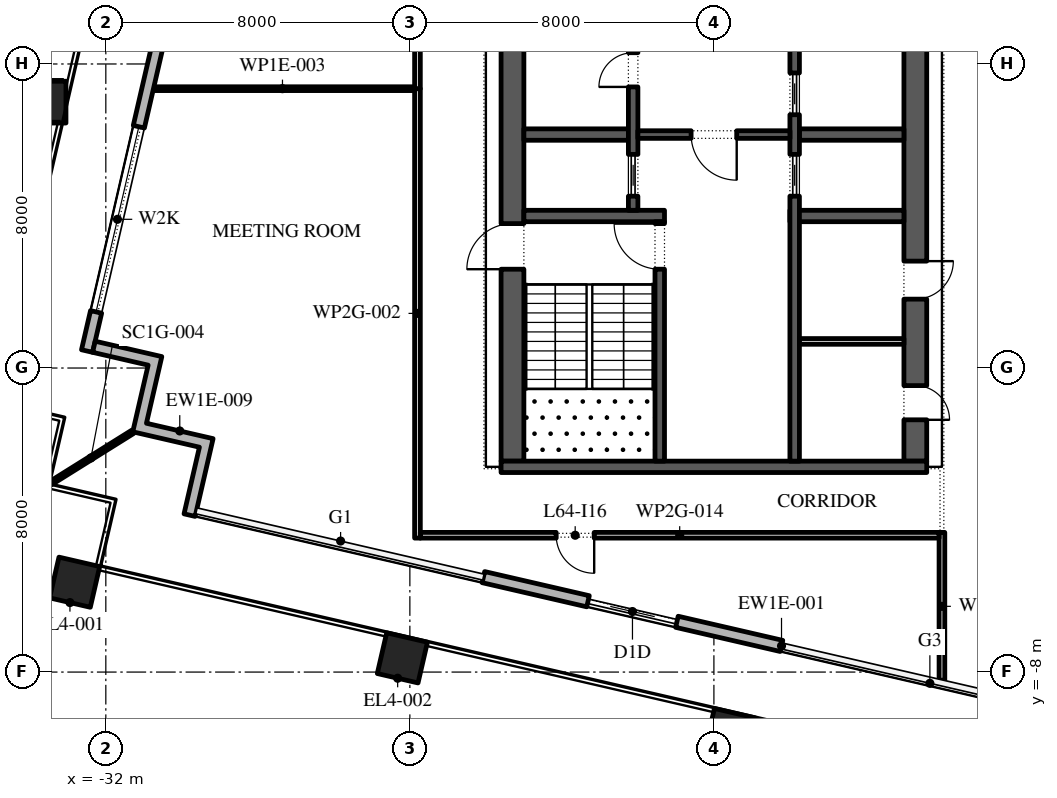
"""IFC4 building model, lengths in metres.
Left out: names, types, materials, properties, quantities, classifications, styles, units other than length and angle.
Written with IfcOpenShell. Run it as: python <this file> out.ifc"""

import sys

from ifc_helpers import new_model, si_unit, direction, frame, frame_2d, origin, origin_2d, place, context, subcontext, project, spatial, polyline, rectangle, outline, extrude, element, fill, save


model = new_model("IFC4")
c1 = context("Model", 3, precision=1e-05, world=origin(), true_north=direction((0.0, 1.0)))
c2 = subcontext(c1, "Body", "Model", "MODEL_VIEW")
j1 = project(units=[si_unit("LENGTHUNIT", "METRE"), si_unit("PLANEANGLEUNIT", "RADIAN")], contexts=[c1])
p1 = place(None, origin())
s1 = spatial("IfcSite", under=j1, at=p1, CompositionType="ELEMENT")
p2 = place(p1, origin())
s2 = spatial("IfcBuilding", under=s1, at=p2, CompositionType="ELEMENT")
p3 = place(p2, frame((0.0, 0.0, 293.4)))
s3 = spatial("IfcBuildingStorey", under=s2, at=p3, CompositionType="ELEMENT", Elevation=293.4)
for number, where, z_axis, x_axis in (
    (1, (-32.821, -5.635, 0.0), (0.0, 0.0, 1.0), (0.974, -0.225, 0.0)),
    (2, (-24.197, -7.626, 0.0), (0.0, 0.0, 1.0), (0.974, -0.225, 0.0)),
    (3, (-15.574, -9.617, 0.0), (0.0, 0.0, 1.0), (0.974, -0.225, 0.0)),
):
    element("IfcColumn", number, at=place(p3, frame(where, z_axis=z_axis, x_axis=x_axis)), inside=s3, PredefinedType="COLUMN", context=c2, shape_type="SweptSolid", body=[
        extrude(rectangle(XDim=1.1, YDim=1.1, at=origin_2d()), origin(), (0.0, 0.0, 1.0), 4.2),
    ])
p4 = place(p3, frame((-33.599, 6.996, 0.0), z_axis=(0.002906057426, 0.012612289227, 0.999916238987), x_axis=(-0.974466825284, 0.224531526563, 0.0)))
e4 = element("IfcColumn", 4, at=p4, inside=s3, PredefinedType="COLUMN", context=c2, shape_type="SweptSolid", body=[
    extrude(rectangle(XDim=1.1, YDim=1.1, at=origin_2d()), origin(), (0.0, 0.0, 1.0), 4.2),
])
p5 = place(p3, frame((-22.065, -5.502, 0.0), z_axis=(0.0, 0.0, 1.0), x_axis=(0.974372279954, -0.224941459176, 0.0)))
e5 = element("IfcWall", 5, at=p5, inside=s3, PredefinedType="STANDARD", context=c2, shape_type="SweptSolid", body=[
    extrude(rectangle(XDim=8.05, YDim=0.3, at=frame_2d((4.025, 0.0))), origin(), (0.0, 0.0, 1.0), 3.75),
])
p6 = place(p5, frame((2.825, 0.0, 0.0)))
e6 = element("IfcOpeningElement", 6, at=p6, cuts=e5, PredefinedType="OPENING", context=c2, shape_type="SweptSolid", body=[
    extrude(rectangle(XDim=2.4, YDim=3.3, at=frame_2d((1.2, 1.65))), frame((0.0, 0.16, 0.0), z_axis=(0.0, -1.0, 0.0), x_axis=(1.0, 0.0, 0.0)), (0.0, 0.0, 1.0), 0.32),
])
p7 = place(p3, origin())
e7 = element("IfcWall", 7, at=p7, inside=s3, PredefinedType="STANDARD", context=c2, shape_type="SweptSolid", body=[
    extrude(outline(polyline([(-31.291, -1.678), (-30.886, 0.076), (-32.348, 0.413), (-32.28, 0.705), (-30.526, 0.301), (-30.931, -1.453), (-29.177, -1.858), (-29.65, -3.905), (-29.942, -3.837), (-29.537, -2.083), (-31.291, -1.678)])), origin(), (0.0, 0.0, 1.0), 3.75),
])
p8 = place(p3, frame((-31.291, -1.678, -0.05), z_axis=(0.0, 0.0, 1.0), x_axis=(-0.84807753525, -0.529872148923, 0.0)))
e8 = element("IfcWall", 8, at=p8, inside=s3, PredefinedType="STANDARD", context=c2, shape_type="SweptSolid", body=[
    extrude(rectangle(XDim=2.596, YDim=0.1, at=frame_2d((1.298, 0.0))), origin(), (0.0, 0.0, 1.0), 3.8),
])
p9 = place(p3, frame((-21.3, -2.45, 0.0), z_axis=(0.0, 0.0, 1.0), x_axis=(0.0, 1.0, 0.0)))
e9 = element("IfcWall", 9, at=p9, inside=s3, PredefinedType="SHEAR", context=c2, shape_type="SweptSolid", body=[
    extrude(rectangle(XDim=27.9, YDim=0.6, at=frame_2d((13.95, 0.0))), origin(), (0.0, 0.0, 1.0), 3.75),
])
p10 = place(p9, frame((5.05, 0.0, 0.0)))
e10 = element("IfcOpeningElement", 10, at=p10, cuts=e9, PredefinedType="OPENING", context=c2, shape_type="SweptSolid", body=[
    extrude(rectangle(XDim=1.2, YDim=2.1, at=frame_2d((0.6, 1.05))), frame((0.0, 0.31, 0.0), z_axis=(0.0, -1.0, 0.0), x_axis=(1.0, 0.0, 0.0)), (0.0, 0.0, 1.0), 0.62),
])
p11 = place(p9, frame((21.65, 0.0, 0.0)))
e11 = element("IfcOpeningElement", 11, at=p11, cuts=e9, PredefinedType="OPENING", context=c2, shape_type="SweptSolid", body=[
    extrude(rectangle(XDim=1.2, YDim=2.1, at=frame_2d((0.6, 1.05))), frame((0.0, 0.31, 0.0), z_axis=(0.0, -1.0, 0.0), x_axis=(1.0, 0.0, 0.0)), (0.0, 0.0, 1.0), 0.62),
])
p12 = place(p3, frame((-10.7, -2.45, 0.0), z_axis=(0.0, 0.0, 1.0), x_axis=(0.0, 1.0, 0.0)))
e12 = element("IfcWall", 12, at=p12, inside=s3, PredefinedType="SHEAR", context=c2, shape_type="SweptSolid", body=[
    extrude(rectangle(XDim=27.9, YDim=0.6, at=frame_2d((13.95, 0.0))), origin(), (0.0, 0.0, 1.0), 3.75),
])
p13 = place(p12, frame((23.65, 0.0, 0.0)))
e13 = element("IfcOpeningElement", 13, at=p13, cuts=e12, PredefinedType="OPENING", context=c2, shape_type="SweptSolid", body=[
    extrude(rectangle(XDim=2.4, YDim=2.1, at=frame_2d((1.2, 1.05))), frame((0.0, 0.31, 0.0), z_axis=(0.0, -1.0, 0.0), x_axis=(1.0, 0.0, 0.0)), (0.0, 0.0, 1.0), 0.62),
])
p14 = place(p12, frame((1.087, 0.0, 0.0)))
e14 = element("IfcOpeningElement", 14, at=p14, cuts=e12, PredefinedType="OPENING", context=c2, shape_type="SweptSolid", body=[
    extrude(rectangle(XDim=0.9, YDim=2.1, at=frame_2d((0.45, 1.05))), frame((0.0, 0.31, 0.0), z_axis=(0.0, -1.0, 0.0), x_axis=(1.0, 0.0, 0.0)), (0.0, 0.0, 1.0), 0.62),
])
p15 = place(p12, frame((4.262, 0.0, 0.0)))
e15 = element("IfcOpeningElement", 15, at=p15, cuts=e12, PredefinedType="OPENING", context=c2, shape_type="SweptSolid", body=[
    extrude(rectangle(XDim=1.0, YDim=2.1, at=frame_2d((0.5, 1.05))), frame((0.0, 0.31, 0.0), z_axis=(0.0, -1.0, 0.0), x_axis=(1.0, 0.0, 0.0)), (0.0, 0.0, 1.0), 0.62),
])
p16 = place(p3, frame((-21.6, -2.6, 0.0), z_axis=(0.0, 0.0, 1.0), x_axis=(1.0, 0.0, 0.0)))
e16 = element("IfcWall", 16, at=p16, inside=s3, PredefinedType="SHEAR", context=c2, shape_type="SweptSolid", body=[
    extrude(rectangle(XDim=11.2, YDim=0.3, at=frame_2d((5.6, 0.0))), origin(), (0.0, 0.0, 1.0), 3.75),
])
p17 = place(p3, frame((-21.0, 4.0, 0.0), z_axis=(0.0, 0.0, 1.0), x_axis=(1.0, 0.0, 0.0)))
e17 = element("IfcWall", 17, at=p17, inside=s3, PredefinedType="SHEAR", context=c2, shape_type="SweptSolid", body=[
    extrude(rectangle(XDim=3.7, YDim=0.3, at=frame_2d((1.85, 0.0))), origin(), (0.0, 0.0, 1.0), 3.75),
])
p18 = place(p3, frame((-17.425, -2.45, 0.0), z_axis=(0.0, 0.0, 1.0), x_axis=(0.0, 1.0, 0.0)))
e18 = element("IfcWall", 18, at=p18, inside=s3, PredefinedType="SHEAR", context=c2, shape_type="SweptSolid", body=[
    extrude(rectangle(XDim=6.3, YDim=0.25, at=frame_2d((3.15, 0.0))), origin(), (0.0, 0.0, 1.0), 3.75),
])
p19 = place(p18, frame((5.05, 0.0, 0.0)))
e19 = element("IfcOpeningElement", 19, at=p19, cuts=e18, PredefinedType="OPENING", context=c2, shape_type="SweptSolid", body=[
    extrude(rectangle(XDim=1.2, YDim=2.1, at=frame_2d((0.6, 1.05))), frame((0.0, 0.135, 0.0), z_axis=(0.0, -1.0, 0.0), x_axis=(1.0, 0.0, 0.0)), (0.0, 0.0, 1.0), 0.27),
])
p20 = place(p3, frame((-21.0, 6.143, 0.0), z_axis=(0.0, 0.0, 1.0), x_axis=(1.0, 0.0, 0.0)))
e20 = element("IfcWall", 20, at=p20, inside=s3, PredefinedType="SHEAR", context=c2, shape_type="SweptSolid", body=[
    extrude(rectangle(XDim=2.75, YDim=0.3, at=frame_2d((1.375, 0.0))), origin(), (0.0, 0.0, 1.0), 3.75),
])
p21 = place(p3, frame((-18.125, 4.15, 0.0), z_axis=(0.0, 0.0, 1.0), x_axis=(0.0, 1.0, 0.0)))
e21 = element("IfcWall", 21, at=p21, inside=s3, PredefinedType="SHEAR", context=c2, shape_type="SweptSolid", body=[
    extrude(rectangle(XDim=14.7, YDim=0.25, at=frame_2d((7.35, 0.0))), origin(), (0.0, 0.0, 1.0), 3.75),
])
p22 = place(p21, frame((3.246, 0.0, 0.0)))
e22 = element("IfcOpeningElement", 22, at=p22, cuts=e21, PredefinedType="OPENING", context=c2, shape_type="SweptSolid", body=[
    extrude(rectangle(XDim=0.9, YDim=2.1, at=frame_2d((0.45, 1.05))), frame((0.0, 0.135, 0.0), z_axis=(0.0, -1.0, 0.0), x_axis=(1.0, 0.0, 0.0)), (0.0, 0.0, 1.0), 0.27),
])
p23 = place(p21, frame((8.454, 0.0, 0.0)))
e23 = element("IfcOpeningElement", 23, at=p23, cuts=e21, PredefinedType="OPENING", context=c2, shape_type="SweptSolid", body=[
    extrude(rectangle(XDim=0.9, YDim=2.1, at=frame_2d((0.45, 1.05))), frame((0.0, 0.135, 0.0), z_axis=(0.0, -1.0, 0.0), x_axis=(1.0, 0.0, 0.0)), (0.0, 0.0, 1.0), 0.27),
])
p24 = place(p21, frame((0.371, 0.0, 0.0)))
e24 = element("IfcOpeningElement", 24, at=p24, cuts=e21, PredefinedType="OPENING", context=c2, shape_type="SweptSolid", body=[
    extrude(rectangle(XDim=1.1, YDim=2.1, at=frame_2d((0.55, 1.05))), frame((0.0, 0.135, 0.0), z_axis=(0.0, -1.0, 0.0), x_axis=(1.0, 0.0, 0.0)), (0.0, 0.0, 1.0), 0.27),
])
p25 = place(p21, frame((13.229, 0.0, 0.0)))
e25 = element("IfcOpeningElement", 25, at=p25, cuts=e21, PredefinedType="OPENING", context=c2, shape_type="SweptSolid", body=[
    extrude(rectangle(XDim=1.1, YDim=2.1, at=frame_2d((0.55, 1.05))), frame((0.0, 0.135, 0.0), z_axis=(0.0, -1.0, 0.0), x_axis=(1.0, 0.0, 0.0)), (0.0, 0.0, 1.0), 0.27),
])
p26 = place(p3, frame((-14.0, 4.0, 0.0), z_axis=(0.0, 0.0, 1.0), x_axis=(1.0, 0.0, 0.0)))
e26 = element("IfcWall", 26, at=p26, inside=s3, PredefinedType="SHEAR", context=c2, shape_type="SweptSolid", body=[
    extrude(rectangle(XDim=3.0, YDim=0.3, at=frame_2d((1.5, 0.0))), origin(), (0.0, 0.0, 1.0), 3.75),
])
p27 = place(p3, frame((-13.75, 6.143, 0.0), z_axis=(0.0, 0.0, 1.0), x_axis=(1.0, 0.0, 0.0)))
e27 = element("IfcWall", 27, at=p27, inside=s3, PredefinedType="SHEAR", context=c2, shape_type="SweptSolid", body=[
    extrude(rectangle(XDim=2.75, YDim=0.3, at=frame_2d((1.375, 0.0))), origin(), (0.0, 0.0, 1.0), 3.75),
])
p28 = place(p3, frame((-13.875, -2.45, 0.0), z_axis=(0.0, 0.0, 1.0), x_axis=(0.0, 1.0, 0.0)))
e28 = element("IfcWall", 28, at=p28, inside=s3, PredefinedType="SHEAR", context=c2, shape_type="SweptSolid", body=[
    extrude(rectangle(XDim=21.3, YDim=0.25, at=frame_2d((10.65, 0.0))), origin(), (0.0, 0.0, 1.0), 3.75),
])
p29 = place(p28, frame((16.261, 0.0, 0.0)))
e29 = element("IfcOpeningElement", 29, at=p29, cuts=e28, PredefinedType="OPENING", context=c2, shape_type="SweptSolid", body=[
    extrude(rectangle(XDim=0.9, YDim=2.1, at=frame_2d((0.45, 1.05))), frame((0.0, 0.135, 0.0), z_axis=(0.0, -1.0, 0.0), x_axis=(1.0, 0.0, 0.0)), (0.0, 0.0, 1.0), 0.27),
])
p30 = place(p28, frame((19.325, 0.0, 0.0)))
e30 = element("IfcOpeningElement", 30, at=p30, cuts=e28, PredefinedType="OPENING", context=c2, shape_type="SweptSolid", body=[
    extrude(rectangle(XDim=0.9, YDim=2.1, at=frame_2d((0.45, 1.05))), frame((0.0, 0.135, 0.0), z_axis=(0.0, -1.0, 0.0), x_axis=(1.0, 0.0, 0.0)), (0.0, 0.0, 1.0), 0.27),
])
p31 = place(p28, frame((6.971, 0.0, 0.0)))
e31 = element("IfcOpeningElement", 31, at=p31, cuts=e28, PredefinedType="OPENING", context=c2, shape_type="SweptSolid", body=[
    extrude(rectangle(XDim=1.1, YDim=2.1, at=frame_2d((0.55, 1.05))), frame((0.0, 0.135, 0.0), z_axis=(0.0, -1.0, 0.0), x_axis=(1.0, 0.0, 0.0)), (0.0, 0.0, 1.0), 0.27),
])
p32 = place(p28, frame((9.114, 0.0, 0.0)))
e32 = element("IfcOpeningElement", 32, at=p32, cuts=e28, PredefinedType="OPENING", context=c2, shape_type="SweptSolid", body=[
    extrude(rectangle(XDim=1.1, YDim=2.1, at=frame_2d((0.55, 1.05))), frame((0.0, 0.135, 0.0), z_axis=(0.0, -1.0, 0.0), x_axis=(1.0, 0.0, 0.0)), (0.0, 0.0, 1.0), 0.27),
])
p33 = place(p28, frame((11.257, 0.0, 0.0)))
e33 = element("IfcOpeningElement", 33, at=p33, cuts=e28, PredefinedType="OPENING", context=c2, shape_type="SweptSolid", body=[
    extrude(rectangle(XDim=1.1, YDim=2.1, at=frame_2d((0.55, 1.05))), frame((0.0, 0.135, 0.0), z_axis=(0.0, -1.0, 0.0), x_axis=(1.0, 0.0, 0.0)), (0.0, 0.0, 1.0), 0.27),
])
p34 = place(p28, frame((13.4, 0.0, 0.0)))
e34 = element("IfcOpeningElement", 34, at=p34, cuts=e28, PredefinedType="OPENING", context=c2, shape_type="SweptSolid", body=[
    extrude(rectangle(XDim=1.1, YDim=2.1, at=frame_2d((0.55, 1.05))), frame((0.0, 0.135, 0.0), z_axis=(0.0, -1.0, 0.0), x_axis=(1.0, 0.0, 0.0)), (0.0, 0.0, 1.0), 0.27),
])
p35 = place(p3, frame((-18.0, 6.143, 0.0), z_axis=(0.0, 0.0, 1.0), x_axis=(1.0, 0.0, 0.0)))
e35 = element("IfcWall", 35, at=p35, inside=s3, PredefinedType="SHEAR", context=c2, shape_type="SweptSolid", body=[
    extrude(rectangle(XDim=4.0, YDim=0.2, at=frame_2d((2.0, 0.0))), origin(), (0.0, 0.0, 1.0), 3.75),
])
p36 = place(p35, frame((1.4, 0.0, 0.0)))
e36 = element("IfcOpeningElement", 36, at=p36, cuts=e35, PredefinedType="OPENING", context=c2, shape_type="SweptSolid", body=[
    extrude(rectangle(XDim=1.2, YDim=2.1, at=frame_2d((0.6, 1.05))), frame((0.0, 0.11, 0.0), z_axis=(0.0, -1.0, 0.0), x_axis=(1.0, 0.0, 0.0)), (0.0, 0.0, 1.0), 0.22),
])
p37 = place(p3, frame((-13.75, 0.7, 0.0), z_axis=(0.0, 0.0, 1.0), x_axis=(1.0, 0.0, 0.0)))
e37 = element("IfcWall", 37, at=p37, inside=s3, PredefinedType="PARTITIONING", context=c2, shape_type="SweptSolid", body=[
    extrude(rectangle(XDim=2.75, YDim=0.15, at=frame_2d((1.375, 0.0))), origin(), (0.0, 0.0, 1.0), 3.75),
])
p38 = place(p3, frame((-23.8, -4.475, 0.0), z_axis=(0.0, 0.0, 1.0), x_axis=(0.0, 1.0, 0.0)))
e38 = element("IfcWall", 38, at=p38, inside=s3, PredefinedType="PARTITIONING", context=c2, shape_type="SweptSolid", body=[
    extrude(rectangle(XDim=11.825, YDim=0.15, at=frame_2d((5.913, 0.0))), origin(), (0.0, 0.0, 1.0), 3.75),
])
p39 = place(p3, frame((-23.875, 7.35, 0.0), z_axis=(0.0, 0.0, 1.0), x_axis=(-1.0, 0.0, 0.0)))
e39 = element("IfcWall", 39, at=p39, inside=s3, PredefinedType="PARTITIONING", context=c2, shape_type="SweptSolid", body=[
    extrude(rectangle(XDim=6.954, YDim=0.1, at=frame_2d((3.477, 0.0))), origin(), (0.0, 0.0, 1.0), 3.75),
])
p40 = place(p3, frame((-23.8, 7.35, 0.0), z_axis=(0.0, 0.0, 1.0), x_axis=(0.0, 1.0, 0.0)))
e40 = element("IfcWall", 40, at=p40, inside=s3, PredefinedType="PARTITIONING", context=c2, shape_type="SweptSolid", body=[
    extrude(rectangle(XDim=22.385, YDim=0.15, at=frame_2d((11.192, 0.0))), origin(), (0.0, 0.0, 1.0), 3.75),
])
p41 = place(p40, frame((10.66, 0.0, 0.0)))
e41 = element("IfcOpeningElement", 41, at=p41, cuts=e40, PredefinedType="OPENING", context=c2, shape_type="SweptSolid", body=[
    extrude(rectangle(XDim=1.0, YDim=2.1, at=frame_2d((0.5, 1.05))), frame((0.0, 0.085, 0.0), z_axis=(0.0, -1.0, 0.0), x_axis=(1.0, 0.0, 0.0)), (0.0, 0.0, 1.0), 0.17),
])
p42 = place(p3, frame((-10.0, -8.216, 0.0), z_axis=(0.0, 0.0, 1.0), x_axis=(0.0, 1.0, 0.0)))
e42 = element("IfcWall", 42, at=p42, inside=s3, PredefinedType="PARTITIONING", context=c2, shape_type="SweptSolid", body=[
    extrude(rectangle(XDim=3.891, YDim=0.15, at=frame_2d((1.946, 0.0))), origin(), (0.0, 0.0, 1.0), 3.75),
])
p43 = place(p3, frame((-10.075, -4.4, 0.0), z_axis=(0.0, 0.0, 1.0), x_axis=(-1.0, 0.0, 0.0)))
e43 = element("IfcWall", 43, at=p43, inside=s3, PredefinedType="PARTITIONING", context=c2, shape_type="SweptSolid", body=[
    extrude(rectangle(XDim=13.65, YDim=0.15, at=frame_2d((6.825, 0.0))), origin(), (0.0, 0.0, 1.0), 3.75),
])
p44 = place(p43, frame((9.075, 0.0, 0.0)))
e44 = element("IfcOpeningElement", 44, at=p44, cuts=e43, PredefinedType="OPENING", context=c2, shape_type="SweptSolid", body=[
    extrude(rectangle(XDim=1.0, YDim=2.1, at=frame_2d((0.5, 1.05))), frame((0.0, 0.085, 0.0), z_axis=(0.0, -1.0, 0.0), x_axis=(1.0, 0.0, 0.0)), (0.0, 0.0, 1.0), 0.17),
])
p45 = place(p3, frame((-22.71, 42.825, 0.0), z_axis=(0.0, 0.0, 1.0), x_axis=(-0.224948057419, -0.974370756675, 0.0)))
e45 = element("IfcWall", 45, at=p45, inside=s3, PredefinedType="STANDARD", context=c2, shape_type="SweptSolid", body=[
    extrude(rectangle(XDim=43.493, YDim=0.3, at=frame_2d((21.747, 0.0))), origin(), (0.0, 0.0, 1.0), 3.75),
])
p46 = place(p45, frame((3.164, 0.0, 0.0)))
e46 = element("IfcOpeningElement", 46, at=p46, cuts=e45, PredefinedType="OPENING", context=c2, shape_type="SweptSolid", body=[
    extrude(rectangle(XDim=2.4, YDim=3.5, at=frame_2d((1.2, 1.75))), frame((0.0, 0.16, 0.0), z_axis=(0.0, -1.0, 0.0), x_axis=(1.0, 0.0, 0.0)), (0.0, 0.0, 1.0), 0.32),
])
p47 = place(p45, frame((8.979, 0.0, 0.45)))
e47 = element("IfcOpeningElement", 47, at=p47, cuts=e45, PredefinedType="OPENING", context=c2, shape_type="SweptSolid", body=[
    extrude(rectangle(XDim=5.0, YDim=3.25, at=frame_2d((2.5, 1.625))), frame((0.0, 0.16, 0.0), z_axis=(0.0, -1.0, 0.0), x_axis=(1.0, 0.0, 0.0)), (0.0, 0.0, 1.0), 0.32),
])
p48 = place(p45, frame((16.093, 0.0, 0.45)))
e48 = element("IfcOpeningElement", 48, at=p48, cuts=e45, PredefinedType="OPENING", context=c2, shape_type="SweptSolid", body=[
    extrude(rectangle(XDim=5.0, YDim=2.7, at=frame_2d((2.5, 1.35))), frame((0.0, 0.16, 0.0), z_axis=(0.0, -1.0, 0.0), x_axis=(1.0, 0.0, 0.0)), (0.0, 0.0, 1.0), 0.32),
])
p49 = place(p45, frame((23.207, 0.0, 0.45)))
e49 = element("IfcOpeningElement", 49, at=p49, cuts=e45, PredefinedType="OPENING", context=c2, shape_type="SweptSolid", body=[
    extrude(rectangle(XDim=5.0, YDim=3.25, at=frame_2d((2.5, 1.625))), frame((0.0, 0.16, 0.0), z_axis=(0.0, -1.0, 0.0), x_axis=(1.0, 0.0, 0.0)), (0.0, 0.0, 1.0), 0.32),
])
p50 = place(p45, frame((31.621, 0.0, 0.0)))
e50 = element("IfcOpeningElement", 50, at=p50, cuts=e45, PredefinedType="OPENING", context=c2, shape_type="SweptSolid", body=[
    extrude(rectangle(XDim=2.4, YDim=3.075, at=frame_2d((1.2, 1.538))), frame((0.0, 0.16, 0.0), z_axis=(0.0, -1.0, 0.0), x_axis=(1.0, 0.0, 0.0)), (0.0, 0.0, 1.0), 0.32),
])
p51 = place(p45, frame((37.436, 0.0, 0.45)))
e51 = element("IfcOpeningElement", 51, at=p51, cuts=e45, PredefinedType="OPENING", context=c2, shape_type="SweptSolid", body=[
    extrude(rectangle(XDim=5.0, YDim=2.575, at=frame_2d((2.5, 1.288))), frame((0.0, 0.16, 0.0), z_axis=(0.0, -1.0, 0.0), x_axis=(1.0, 0.0, 0.0)), (0.0, 0.0, 1.0), 0.32),
])
p52 = place(p6, origin())
e52 = element("IfcDoor", 52, at=p52, inside=s3, OperationType="DOUBLE_DOOR_SLIDING", PredefinedType="DOOR", context=c2, shape_type="SweptSolid", body=[
    extrude(rectangle(XDim=2.4, YDim=3.3, at=frame_2d((1.2, 1.65))), frame((0.0, 0.025, 0.0), z_axis=(0.0, -1.0, 0.0), x_axis=(1.0, 0.0, 0.0)), (0.0, 0.0, 1.0), 0.05),
])
fill(e6, e52)
p53 = place(p51, origin())
e53 = element("IfcWindow", 53, at=p53, inside=s3, PartitioningType="DOUBLE_PANEL_VERTICAL", PredefinedType="WINDOW", context=c2, shape_type="SweptSolid", body=[
    extrude(rectangle(XDim=5.0, YDim=2.575, at=frame_2d((2.5, 1.288))), frame((0.0, 0.03, 0.0), z_axis=(0.0, -1.0, 0.0), x_axis=(1.0, 0.0, 0.0)), (0.0, 0.0, 1.0), 0.06),
])
fill(e51, e53)
p54 = place(p22, origin())
e54 = element("IfcDoor", 54, at=p54, inside=s3, OperationType="SINGLE_SWING_RIGHT", PredefinedType="DOOR", context=c2, shape_type="SweptSolid", body=[
    extrude(rectangle(XDim=0.9, YDim=2.1, at=frame_2d((0.45, 1.05))), frame((0.0, 0.125, 0.0), z_axis=(0.0, -1.0, 0.0), x_axis=(1.0, 0.0, 0.0)), (0.0, 0.0, 1.0), 0.05),
])
fill(e22, e54)
p55 = place(p24, origin())
e55 = element("IfcDoor", 55, at=p55, inside=s3, OperationType="SLIDING_TO_LEFT", PredefinedType="DOOR", context=c2, shape_type="SweptSolid", body=[
    extrude(rectangle(XDim=1.1, YDim=2.1, at=frame_2d((0.55, 1.05))), frame((0.0, 0.025, 0.0), z_axis=(0.0, -1.0, 0.0), x_axis=(1.0, 0.0, 0.0)), (0.0, 0.0, 1.0), 0.05),
])
fill(e24, e55)
p56 = place(p31, origin())
e56 = element("IfcDoor", 56, at=p56, inside=s3, OperationType="SLIDING_TO_LEFT", PredefinedType="DOOR", context=c2, shape_type="SweptSolid", body=[
    extrude(rectangle(XDim=1.1, YDim=2.1, at=frame_2d((0.55, 1.05))), frame((0.0, 0.025, 0.0), z_axis=(0.0, -1.0, 0.0), x_axis=(1.0, 0.0, 0.0)), (0.0, 0.0, 1.0), 0.05),
])
fill(e31, e56)
p57 = place(p32, origin())
e57 = element("IfcDoor", 57, at=p57, inside=s3, OperationType="SLIDING_TO_LEFT", PredefinedType="DOOR", context=c2, shape_type="SweptSolid", body=[
    extrude(rectangle(XDim=1.1, YDim=2.1, at=frame_2d((0.55, 1.05))), frame((0.0, 0.025, 0.0), z_axis=(0.0, -1.0, 0.0), x_axis=(1.0, 0.0, 0.0)), (0.0, 0.0, 1.0), 0.05),
])
fill(e32, e57)
p58 = place(p36, frame((1.2, 0.0, 0.0), z_axis=(0.0, 0.0, 1.0), x_axis=(-1.0, 0.0, 0.0)))
e58 = element("IfcDoor", 58, at=p58, inside=s3, OperationType="SINGLE_SWING_RIGHT", PredefinedType="DOOR", context=c2, shape_type="SweptSolid", body=[
    extrude(rectangle(XDim=1.2, YDim=2.1, at=frame_2d((0.6, 1.05))), frame((0.0, 0.025, 0.0), z_axis=(0.0, -1.0, 0.0), x_axis=(1.0, 0.0, 0.0)), (0.0, 0.0, 1.0), 0.05),
])
fill(e36, e58)
p59 = place(p19, origin())
e59 = element("IfcDoor", 59, at=p59, inside=s3, OperationType="SINGLE_SWING_LEFT", PredefinedType="DOOR", context=c2, shape_type="SweptSolid", body=[
    extrude(rectangle(XDim=1.2, YDim=2.1, at=frame_2d((0.6, 1.05))), frame((0.0, 0.025, 0.0), z_axis=(0.0, -1.0, 0.0), x_axis=(1.0, 0.0, 0.0)), (0.0, 0.0, 1.0), 0.05),
])
fill(e19, e59)
p60 = place(p10, origin())
e60 = element("IfcDoor", 60, at=p60, inside=s3, OperationType="SINGLE_SWING_RIGHT", PredefinedType="DOOR", context=c2, shape_type="SweptSolid", body=[
    extrude(rectangle(XDim=1.2, YDim=2.1, at=frame_2d((0.6, 1.05))), frame((0.0, 0.025, 0.0), z_axis=(0.0, -1.0, 0.0), x_axis=(1.0, 0.0, 0.0)), (0.0, 0.0, 1.0), 0.05),
])
fill(e10, e60)
p61 = place(p14, frame((0.9, 0.55, 0.0), z_axis=(0.0, 0.0, 1.0), x_axis=(-1.0, 0.0, 0.0)))
e61 = element("IfcDoor", 61, at=p61, inside=s3, OperationType="SINGLE_SWING_LEFT", PredefinedType="DOOR", context=c2, shape_type="SweptSolid", body=[
    extrude(rectangle(XDim=0.9, YDim=2.1, at=frame_2d((0.45, 1.05))), frame((0.0, 0.3, 0.0), z_axis=(0.0, -1.0, 0.0), x_axis=(1.0, 0.0, 0.0)), (0.0, 0.0, 1.0), 0.05),
])
fill(e14, e61)
p62 = place(p15, frame((1.0, 0.55, 0.0), z_axis=(0.0, 0.0, 1.0), x_axis=(-1.0, 0.0, 0.0)))
e62 = element("IfcDoor", 62, at=p62, inside=s3, OperationType="SINGLE_SWING_RIGHT", PredefinedType="DOOR", context=c2, shape_type="SweptSolid", body=[
    extrude(rectangle(XDim=1.0, YDim=2.1, at=frame_2d((0.5, 1.05))), frame((0.0, 0.3, 0.0), z_axis=(0.0, -1.0, 0.0), x_axis=(1.0, 0.0, 0.0)), (0.0, 0.0, 1.0), 0.05),
])
fill(e15, e62)
p63 = place(p44, origin())
e63 = element("IfcDoor", 63, at=p63, inside=s3, OperationType="SINGLE_SWING_RIGHT", PredefinedType="DOOR", context=c2, shape_type="SweptSolid", body=[
    extrude(rectangle(XDim=1.0, YDim=2.1, at=frame_2d((0.5, 1.05))), frame((0.0, 0.025, 0.0), z_axis=(0.0, -1.0, 0.0), x_axis=(1.0, 0.0, 0.0)), (0.0, 0.0, 1.0), 0.05),
])
fill(e44, e63)
save(model, sys.argv[1])
